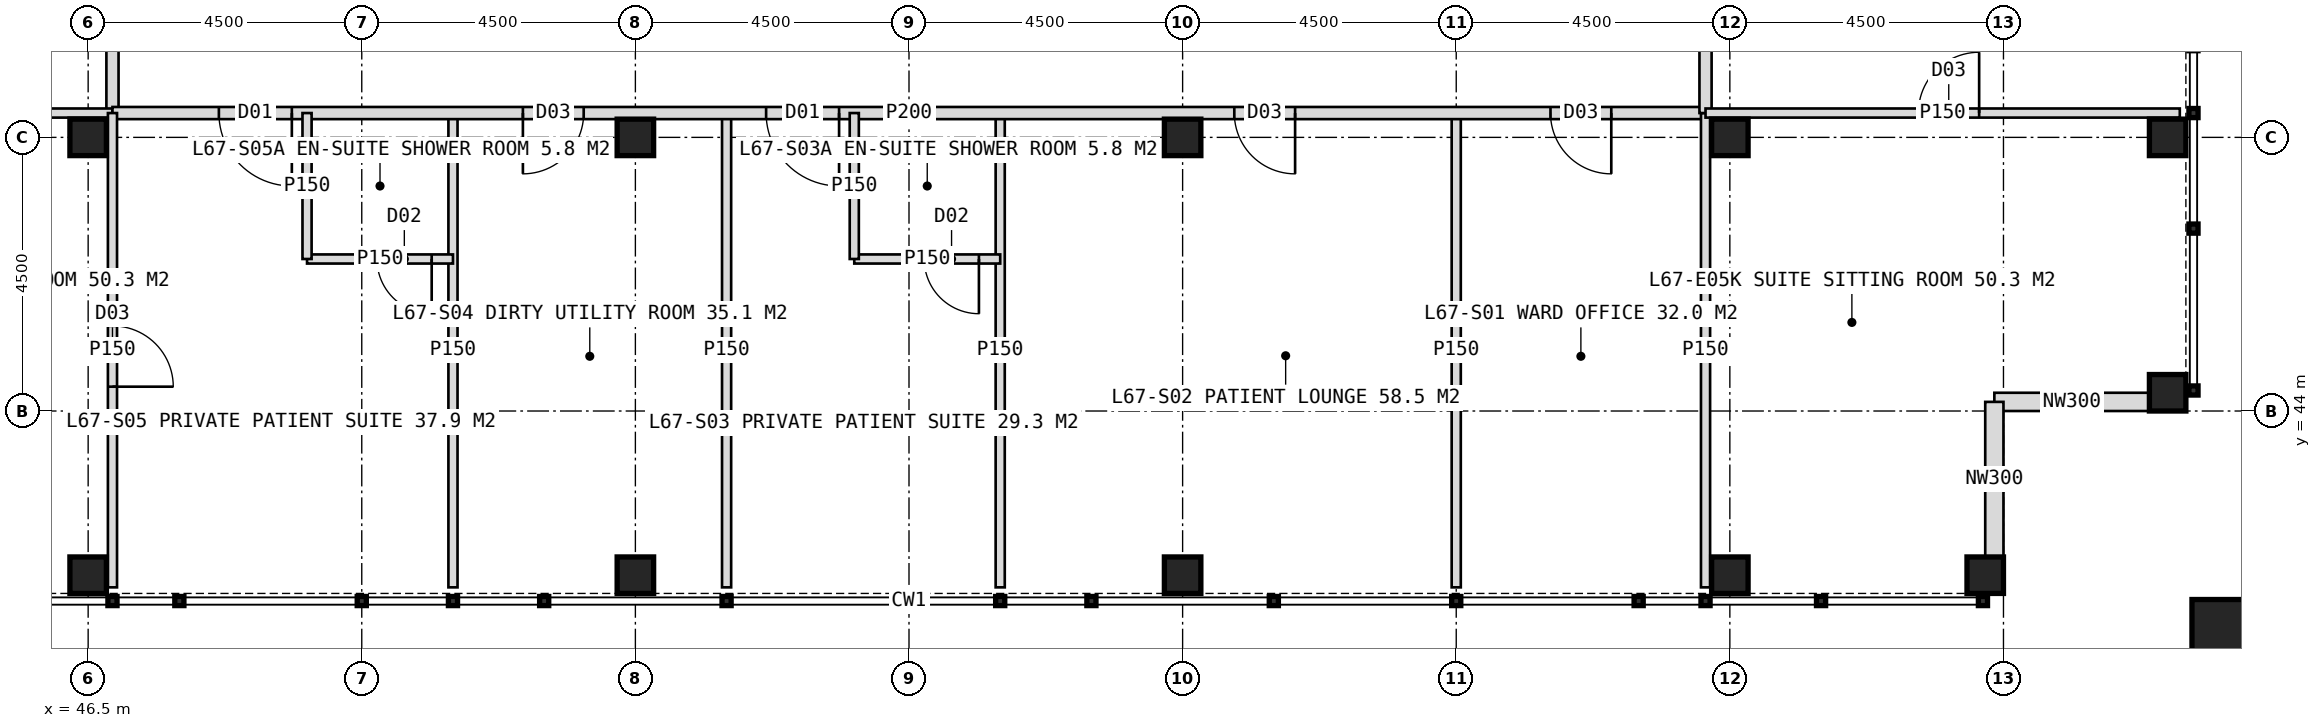
"""IFC4 building model, lengths in metres.
Left out: names, types, materials, properties, quantities, classifications, styles, units other than length and angle.
Written with IfcOpenShell. Run it as: python <this file> out.ifc"""

import sys

from ifc_helpers import new_model, si_unit, direction, frame, frame_2d, origin, origin_2d, place, context, subcontext, project, spatial, rectangle, hollow_rectangle, extrude, element, fill, save


model = new_model("IFC4")
c1 = context("Model", 3, precision=1e-05, world=origin(), true_north=direction((0.0, 1.0)))
c2 = subcontext(c1, "Body", "Model", "MODEL_VIEW")
j1 = project(units=[si_unit("LENGTHUNIT", "METRE"), si_unit("PLANEANGLEUNIT", "RADIAN")], contexts=[c1])
p1 = place(None, origin())
s1 = spatial("IfcSite", under=j1, at=p1, CompositionType="ELEMENT")
p2 = place(p1, origin())
s2 = spatial("IfcBuilding", under=s1, at=p2, CompositionType="ELEMENT")
p3 = place(p2, frame((0.0, 0.0, 278.0)))
s3 = spatial("IfcBuildingStorey", under=s2, at=p3, CompositionType="ELEMENT", Elevation=278.0)
for number, where, z_axis, x_axis in (
    (1, (46.5, 48.5, 0.0), (0.0, 0.0, 1.0), (1.0, 0.0, 0.0)),
    (2, (73.5, 48.5, 0.0), (0.0, 0.0, 1.0), (1.0, 0.0, 0.0)),
    (3, (55.5, 48.5, 0.0), (0.0, 0.0, 1.0), (1.0, 0.0, 0.0)),
    (4, (64.5, 48.5, 0.0), (0.0, 0.0, 1.0), (1.0, 0.0, 0.0)),
    (5, (80.7, 44.3, 0.0), (0.0, 0.0, 1.0), (1.0, 0.0, 0.0)),
    (6, (46.5, 41.3, 0.0), (0.0, 0.0, 1.0), (1.0, 0.0, 0.0)),
    (7, (80.7, 48.5, 0.0), (0.0, 0.0, 1.0), (1.0, 0.0, 0.0)),
    (8, (55.5, 41.3, 0.0), (0.0, 0.0, 1.0), (1.0, 0.0, 0.0)),
    (9, (64.5, 41.3, 0.0), (0.0, 0.0, 1.0), (1.0, 0.0, 0.0)),
    (10, (73.5, 41.3, 0.0), (0.0, 0.0, 1.0), (1.0, 0.0, 0.0)),
    (11, (77.7, 41.3, 0.0), (0.0, 0.0, 1.0), (1.0, 0.0, 0.0)),
):
    element("IfcColumn", number, at=place(p3, frame(where, z_axis=z_axis, x_axis=x_axis)), inside=s3, PredefinedType="COLUMN", context=c2, shape_type="SweptSolid", body=[
        extrude(hollow_rectangle(XDim=0.6, YDim=0.6, WallThickness=0.04, at=origin_2d()), origin(), (0.0, 0.0, 1.0), 4.0),
    ])
p4 = place(p3, frame((81.6, 40.4, 0.0), z_axis=(0.0, 0.0, 1.0), x_axis=(1.0, 0.0, 0.0)))
e12 = element("IfcColumn", 12, at=p4, inside=s3, PredefinedType="COLUMN", context=c2, shape_type="SweptSolid", body=[
    extrude(hollow_rectangle(XDim=1.0, YDim=1.0, WallThickness=0.06, at=origin_2d()), origin(), (0.0, 0.0, 1.0), 4.0),
])
for number, where, z_axis, x_axis in (
    (13, (80.4, 44.15, 0.0), (0.0, 0.0, 1.0), (-1.0, 0.0, 0.0)),
    (14, (77.85, 44.15, 0.0), (0.0, 0.0, 1.0), (0.0, -1.0, 0.0)),
):
    element("IfcWall", number, at=place(p3, frame(where, z_axis=z_axis, x_axis=x_axis)), inside=s3, PredefinedType="ELEMENTEDWALL", context=c2, shape_type="SweptSolid", body=[
        extrude(rectangle(XDim=2.55, YDim=0.3, at=frame_2d((1.275, 0.0))), origin(), (0.0, 0.0, 1.0), 2.95),
    ])
p5 = place(p3, frame((46.9, 48.9, 0.0), z_axis=(0.0, 0.0, 1.0), x_axis=(0.0, 1.0, 0.0)))
e15 = element("IfcWall", 15, at=p5, inside=s3, PredefinedType="PARTITIONING", context=c2, shape_type="SweptSolid", body=[
    extrude(rectangle(XDim=26.2, YDim=0.2, at=frame_2d((13.1, 0.0))), origin(), (0.0, 0.0, 1.0), 3.75),
])
p6 = place(p5, frame((1.75, 0.0, 0.0)))
e16 = element("IfcOpeningElement", 16, at=p6, cuts=e15, PredefinedType="OPENING", context=c2, shape_type="SweptSolid", body=[
    extrude(rectangle(XDim=1.2, YDim=2.2, at=frame_2d((0.6, 1.1))), frame((0.0, 0.11, 0.0), z_axis=(0.0, -1.0, 0.0), x_axis=(1.0, 0.0, 0.0)), (0.0, 0.0, 1.0), 0.22),
])
p7 = place(p5, frame((6.75, 0.0, 0.0)))
e17 = element("IfcOpeningElement", 17, at=p7, cuts=e15, PredefinedType="OPENING", context=c2, shape_type="SweptSolid", body=[
    extrude(rectangle(XDim=1.0, YDim=2.1, at=frame_2d((0.5, 1.05))), frame((0.0, 0.11, 0.0), z_axis=(0.0, -1.0, 0.0), x_axis=(1.0, 0.0, 0.0)), (0.0, 0.0, 1.0), 0.22),
])
p8 = place(p5, frame((11.1, 0.0, 0.0)))
e18 = element("IfcOpeningElement", 18, at=p8, cuts=e15, PredefinedType="OPENING", context=c2, shape_type="SweptSolid", body=[
    extrude(rectangle(XDim=1.0, YDim=2.1, at=frame_2d((0.5, 1.05))), frame((0.0, 0.11, 0.0), z_axis=(0.0, -1.0, 0.0), x_axis=(1.0, 0.0, 0.0)), (0.0, 0.0, 1.0), 0.22),
])
p9 = place(p5, frame((15.75, 0.0, 0.0)))
e19 = element("IfcOpeningElement", 19, at=p9, cuts=e15, PredefinedType="OPENING", context=c2, shape_type="SweptSolid", body=[
    extrude(rectangle(XDim=1.0, YDim=2.1, at=frame_2d((0.5, 1.05))), frame((0.0, 0.11, 0.0), z_axis=(0.0, -1.0, 0.0), x_axis=(1.0, 0.0, 0.0)), (0.0, 0.0, 1.0), 0.22),
])
p10 = place(p5, frame((23.25, 0.0, 0.0)))
e20 = element("IfcOpeningElement", 20, at=p10, cuts=e15, PredefinedType="OPENING", context=c2, shape_type="SweptSolid", body=[
    extrude(rectangle(XDim=1.2, YDim=2.2, at=frame_2d((0.6, 1.1))), frame((0.0, 0.11, 0.0), z_axis=(0.0, -1.0, 0.0), x_axis=(1.0, 0.0, 0.0)), (0.0, 0.0, 1.0), 0.22),
])
for number, where, z_axis, x_axis in (
    (21, (46.9, 48.9, 0.0), (0.0, 0.0, 1.0), (-1.0, 0.0, 0.0)),
    (22, (69.0, 48.9, 0.0), (0.0, 0.0, 1.0), (0.0, -1.0, 0.0)),
    (23, (61.5, 48.9, 0.0), (0.0, 0.0, 1.0), (0.0, -1.0, 0.0)),
    (24, (57.0, 48.9, 0.0), (0.0, 0.0, 1.0), (0.0, -1.0, 0.0)),
    (25, (52.5, 48.9, 0.0), (0.0, 0.0, 1.0), (0.0, -1.0, 0.0)),
):
    element("IfcWall", number, at=place(p3, frame(where, z_axis=z_axis, x_axis=x_axis)), inside=s3, PredefinedType="PARTITIONING", context=c2, shape_type="SweptSolid", body=[
        extrude(rectangle(XDim=7.8, YDim=0.15, at=frame_2d((3.9, 0.0))), origin(), (0.0, 0.0, 1.0), 3.75),
    ])
p11 = place(p3, frame((73.1, 48.9, 0.0), z_axis=(0.0, 0.0, 1.0), x_axis=(-1.0, 0.0, 0.0)))
e26 = element("IfcWall", 26, at=p11, inside=s3, PredefinedType="PARTITIONING", context=c2, shape_type="SweptSolid", body=[
    extrude(rectangle(XDim=26.2, YDim=0.2, at=frame_2d((13.1, 0.0))), origin(), (0.0, 0.0, 1.0), 3.75),
])
p12 = place(p11, frame((1.55, 0.0, 0.0)))
e27 = element("IfcOpeningElement", 27, at=p12, cuts=e26, PredefinedType="OPENING", context=c2, shape_type="SweptSolid", body=[
    extrude(rectangle(XDim=1.0, YDim=2.1, at=frame_2d((0.5, 1.05))), frame((0.0, 0.11, 0.0), z_axis=(0.0, -1.0, 0.0), x_axis=(1.0, 0.0, 0.0)), (0.0, 0.0, 1.0), 0.22),
])
p13 = place(p11, frame((6.75, 0.0, 0.0)))
e28 = element("IfcOpeningElement", 28, at=p13, cuts=e26, PredefinedType="OPENING", context=c2, shape_type="SweptSolid", body=[
    extrude(rectangle(XDim=1.0, YDim=2.1, at=frame_2d((0.5, 1.05))), frame((0.0, 0.11, 0.0), z_axis=(0.0, -1.0, 0.0), x_axis=(1.0, 0.0, 0.0)), (0.0, 0.0, 1.0), 0.22),
])
p14 = place(p11, frame((14.25, 0.0, 0.0)))
e29 = element("IfcOpeningElement", 29, at=p14, cuts=e26, PredefinedType="OPENING", context=c2, shape_type="SweptSolid", body=[
    extrude(rectangle(XDim=1.2, YDim=2.2, at=frame_2d((0.6, 1.1))), frame((0.0, 0.11, 0.0), z_axis=(0.0, -1.0, 0.0), x_axis=(1.0, 0.0, 0.0)), (0.0, 0.0, 1.0), 0.22),
])
p15 = place(p11, frame((18.45, 0.0, 0.0)))
e30 = element("IfcOpeningElement", 30, at=p15, cuts=e26, PredefinedType="OPENING", context=c2, shape_type="SweptSolid", body=[
    extrude(rectangle(XDim=1.0, YDim=2.1, at=frame_2d((0.5, 1.05))), frame((0.0, 0.11, 0.0), z_axis=(0.0, -1.0, 0.0), x_axis=(1.0, 0.0, 0.0)), (0.0, 0.0, 1.0), 0.22),
])
p16 = place(p11, frame((23.25, 0.0, 0.0)))
e31 = element("IfcOpeningElement", 31, at=p16, cuts=e26, PredefinedType="OPENING", context=c2, shape_type="SweptSolid", body=[
    extrude(rectangle(XDim=1.2, YDim=2.2, at=frame_2d((0.6, 1.1))), frame((0.0, 0.11, 0.0), z_axis=(0.0, -1.0, 0.0), x_axis=(1.0, 0.0, 0.0)), (0.0, 0.0, 1.0), 0.22),
])
p17 = place(p3, frame((73.1, 48.9, 0.0), z_axis=(0.0, 0.0, 1.0), x_axis=(0.0, -1.0, 0.0)))
e32 = element("IfcWall", 32, at=p17, inside=s3, PredefinedType="PARTITIONING", context=c2, shape_type="SweptSolid", body=[
    extrude(rectangle(XDim=7.8, YDim=0.15, at=frame_2d((3.9, 0.0))), origin(), (0.0, 0.0, 1.0), 3.75),
])
p18 = place(p3, frame((61.5, 46.5, 0.0), z_axis=(0.0, 0.0, 1.0), x_axis=(-1.0, 0.0, 0.0)))
e33 = element("IfcWall", 33, at=p18, inside=s3, PredefinedType="PARTITIONING", context=c2, shape_type="SweptSolid", body=[
    extrude(rectangle(XDim=2.4, YDim=0.15, at=frame_2d((1.2, 0.0))), origin(), (0.0, 0.0, 1.0), 3.75),
])
p19 = place(p18, frame((0.35, 0.0, 0.0)))
e34 = element("IfcOpeningElement", 34, at=p19, cuts=e33, PredefinedType="OPENING", context=c2, shape_type="SweptSolid", body=[
    extrude(rectangle(XDim=0.9, YDim=2.1, at=frame_2d((0.45, 1.05))), frame((0.0, 0.085, 0.0), z_axis=(0.0, -1.0, 0.0), x_axis=(1.0, 0.0, 0.0)), (0.0, 0.0, 1.0), 0.17),
])
p20 = place(p3, frame((59.1, 48.9, 0.0), z_axis=(0.0, 0.0, 1.0), x_axis=(0.0, -1.0, 0.0)))
e35 = element("IfcWall", 35, at=p20, inside=s3, PredefinedType="PARTITIONING", context=c2, shape_type="SweptSolid", body=[
    extrude(rectangle(XDim=2.4, YDim=0.15, at=frame_2d((1.2, 0.0))), origin(), (0.0, 0.0, 1.0), 3.75),
])
p21 = place(p3, frame((46.9, 48.9, 0.0), z_axis=(0.0, 0.0, 1.0), x_axis=(0.0, -1.0, 0.0)))
e36 = element("IfcWall", 36, at=p21, inside=s3, PredefinedType="PARTITIONING", context=c2, shape_type="SweptSolid", body=[
    extrude(rectangle(XDim=7.8, YDim=0.15, at=frame_2d((3.9, 0.0))), origin(), (0.0, 0.0, 1.0), 3.75),
])
p22 = place(p21, frame((3.5, 0.0, 0.0)))
e37 = element("IfcOpeningElement", 37, at=p22, cuts=e36, PredefinedType="OPENING", context=c2, shape_type="SweptSolid", body=[
    extrude(rectangle(XDim=1.0, YDim=2.1, at=frame_2d((0.5, 1.05))), frame((0.0, 0.085, 0.0), z_axis=(0.0, -1.0, 0.0), x_axis=(1.0, 0.0, 0.0)), (0.0, 0.0, 1.0), 0.17),
])
p23 = place(p3, frame((52.5, 46.5, 0.0), z_axis=(0.0, 0.0, 1.0), x_axis=(-1.0, 0.0, 0.0)))
e38 = element("IfcWall", 38, at=p23, inside=s3, PredefinedType="PARTITIONING", context=c2, shape_type="SweptSolid", body=[
    extrude(rectangle(XDim=2.4, YDim=0.15, at=frame_2d((1.2, 0.0))), origin(), (0.0, 0.0, 1.0), 3.75),
])
p24 = place(p23, frame((0.35, 0.0, 0.0)))
e39 = element("IfcOpeningElement", 39, at=p24, cuts=e38, PredefinedType="OPENING", context=c2, shape_type="SweptSolid", body=[
    extrude(rectangle(XDim=0.9, YDim=2.1, at=frame_2d((0.45, 1.05))), frame((0.0, 0.085, 0.0), z_axis=(0.0, -1.0, 0.0), x_axis=(1.0, 0.0, 0.0)), (0.0, 0.0, 1.0), 0.17),
])
p25 = place(p3, frame((50.1, 48.9, 0.0), z_axis=(0.0, 0.0, 1.0), x_axis=(0.0, -1.0, 0.0)))
e40 = element("IfcWall", 40, at=p25, inside=s3, PredefinedType="PARTITIONING", context=c2, shape_type="SweptSolid", body=[
    extrude(rectangle(XDim=2.4, YDim=0.15, at=frame_2d((1.2, 0.0))), origin(), (0.0, 0.0, 1.0), 3.75),
])
p26 = place(p3, frame((73.1, 71.0, 0.0), z_axis=(0.0, 0.0, 1.0), x_axis=(0.0, -1.0, 0.0)))
e41 = element("IfcWall", 41, at=p26, inside=s3, PredefinedType="PARTITIONING", context=c2, shape_type="SweptSolid", body=[
    extrude(rectangle(XDim=22.1, YDim=0.2, at=frame_2d((11.05, 0.0))), origin(), (0.0, 0.0, 1.0), 3.75),
])
p27 = place(p26, frame((2.5, 0.0, 0.0)))
e42 = element("IfcOpeningElement", 42, at=p27, cuts=e41, PredefinedType="OPENING", context=c2, shape_type="SweptSolid", body=[
    extrude(rectangle(XDim=1.0, YDim=2.1, at=frame_2d((0.5, 1.05))), frame((0.0, 0.11, 0.0), z_axis=(0.0, -1.0, 0.0), x_axis=(1.0, 0.0, 0.0)), (0.0, 0.0, 1.0), 0.22),
])
p28 = place(p26, frame((7.0, 0.0, 0.0)))
e43 = element("IfcOpeningElement", 43, at=p28, cuts=e41, PredefinedType="OPENING", context=c2, shape_type="SweptSolid", body=[
    extrude(rectangle(XDim=1.0, YDim=2.1, at=frame_2d((0.5, 1.05))), frame((0.0, 0.11, 0.0), z_axis=(0.0, -1.0, 0.0), x_axis=(1.0, 0.0, 0.0)), (0.0, 0.0, 1.0), 0.22),
])
p29 = place(p26, frame((9.75, 0.0, 0.0)))
e44 = element("IfcOpeningElement", 44, at=p29, cuts=e41, PredefinedType="OPENING", context=c2, shape_type="SweptSolid", body=[
    extrude(rectangle(XDim=0.9, YDim=2.1, at=frame_2d((0.45, 1.05))), frame((0.0, 0.11, 0.0), z_axis=(0.0, -1.0, 0.0), x_axis=(1.0, 0.0, 0.0)), (0.0, 0.0, 1.0), 0.22),
])
p30 = place(p26, frame((11.65, 0.0, 0.0)))
e45 = element("IfcOpeningElement", 45, at=p30, cuts=e41, PredefinedType="OPENING", context=c2, shape_type="SweptSolid", body=[
    extrude(rectangle(XDim=1.0, YDim=2.1, at=frame_2d((0.5, 1.05))), frame((0.0, 0.11, 0.0), z_axis=(0.0, -1.0, 0.0), x_axis=(1.0, 0.0, 0.0)), (0.0, 0.0, 1.0), 0.22),
])
p31 = place(p26, frame((19.15, 0.0, 0.0)))
e46 = element("IfcOpeningElement", 46, at=p31, cuts=e41, PredefinedType="OPENING", context=c2, shape_type="SweptSolid", body=[
    extrude(rectangle(XDim=1.2, YDim=2.2, at=frame_2d((0.6, 1.1))), frame((0.0, 0.11, 0.0), z_axis=(0.0, -1.0, 0.0), x_axis=(1.0, 0.0, 0.0)), (0.0, 0.0, 1.0), 0.22),
])
p32 = place(p3, frame((73.1, 48.9, 0.0), z_axis=(0.0, 0.0, 1.0), x_axis=(1.0, 0.0, 0.0)))
e47 = element("IfcWall", 47, at=p32, inside=s3, PredefinedType="PARTITIONING", context=c2, shape_type="SweptSolid", body=[
    extrude(rectangle(XDim=7.8, YDim=0.15, at=frame_2d((3.9, 0.0))), origin(), (0.0, 0.0, 1.0), 3.75),
])
p33 = place(p32, frame((3.5, 0.0, 0.0)))
e48 = element("IfcOpeningElement", 48, at=p33, cuts=e47, PredefinedType="OPENING", context=c2, shape_type="SweptSolid", body=[
    extrude(rectangle(XDim=1.0, YDim=2.1, at=frame_2d((0.5, 1.05))), frame((0.0, 0.085, 0.0), z_axis=(0.0, -1.0, 0.0), x_axis=(1.0, 0.0, 0.0)), (0.0, 0.0, 1.0), 0.17),
])
p34 = place(p12, origin())
e49 = element("IfcDoor", 49, at=p34, inside=s3, OperationType="SINGLE_SWING_LEFT", PredefinedType="DOOR", context=c2, shape_type="SweptSolid", body=[
    extrude(rectangle(XDim=1.0, YDim=2.1, at=frame_2d((0.5, 1.05))), frame((0.0, 0.025, 0.0), z_axis=(0.0, -1.0, 0.0), x_axis=(1.0, 0.0, 0.0)), (0.0, 0.0, 1.0), 0.05),
])
fill(e27, e49)
p35 = place(p13, origin())
e50 = element("IfcDoor", 50, at=p35, inside=s3, OperationType="SINGLE_SWING_LEFT", PredefinedType="DOOR", context=c2, shape_type="SweptSolid", body=[
    extrude(rectangle(XDim=1.0, YDim=2.1, at=frame_2d((0.5, 1.05))), frame((0.0, 0.025, 0.0), z_axis=(0.0, -1.0, 0.0), x_axis=(1.0, 0.0, 0.0)), (0.0, 0.0, 1.0), 0.05),
])
fill(e28, e50)
p36 = place(p14, origin())
e51 = element("IfcDoor", 51, at=p36, inside=s3, OperationType="SINGLE_SWING_LEFT", PredefinedType="DOOR", context=c2, shape_type="SweptSolid", body=[
    extrude(rectangle(XDim=1.2, YDim=2.2, at=frame_2d((0.6, 1.1))), frame((0.0, 0.025, 0.0), z_axis=(0.0, -1.0, 0.0), x_axis=(1.0, 0.0, 0.0)), (0.0, 0.0, 1.0), 0.05),
])
fill(e29, e51)
p37 = place(p19, origin())
e52 = element("IfcDoor", 52, at=p37, inside=s3, OperationType="SINGLE_SWING_LEFT", PredefinedType="DOOR", context=c2, shape_type="SweptSolid", body=[
    extrude(rectangle(XDim=0.9, YDim=2.1, at=frame_2d((0.45, 1.05))), frame((0.0, 0.025, 0.0), z_axis=(0.0, -1.0, 0.0), x_axis=(1.0, 0.0, 0.0)), (0.0, 0.0, 1.0), 0.05),
])
fill(e34, e52)
p38 = place(p15, origin())
e53 = element("IfcDoor", 53, at=p38, inside=s3, OperationType="SINGLE_SWING_RIGHT", PredefinedType="DOOR", context=c2, shape_type="SweptSolid", body=[
    extrude(rectangle(XDim=1.0, YDim=2.1, at=frame_2d((0.5, 1.05))), frame((0.0, 0.025, 0.0), z_axis=(0.0, -1.0, 0.0), x_axis=(1.0, 0.0, 0.0)), (0.0, 0.0, 1.0), 0.05),
])
fill(e30, e53)
p39 = place(p22, origin())
e54 = element("IfcDoor", 54, at=p39, inside=s3, OperationType="SINGLE_SWING_RIGHT", PredefinedType="DOOR", context=c2, shape_type="SweptSolid", body=[
    extrude(rectangle(XDim=1.0, YDim=2.1, at=frame_2d((0.5, 1.05))), frame((0.0, 0.025, 0.0), z_axis=(0.0, -1.0, 0.0), x_axis=(1.0, 0.0, 0.0)), (0.0, 0.0, 1.0), 0.05),
])
fill(e37, e54)
p40 = place(p16, origin())
e55 = element("IfcDoor", 55, at=p40, inside=s3, OperationType="SINGLE_SWING_LEFT", PredefinedType="DOOR", context=c2, shape_type="SweptSolid", body=[
    extrude(rectangle(XDim=1.2, YDim=2.2, at=frame_2d((0.6, 1.1))), frame((0.0, 0.025, 0.0), z_axis=(0.0, -1.0, 0.0), x_axis=(1.0, 0.0, 0.0)), (0.0, 0.0, 1.0), 0.05),
])
fill(e31, e55)
p41 = place(p24, origin())
e56 = element("IfcDoor", 56, at=p41, inside=s3, OperationType="SINGLE_SWING_LEFT", PredefinedType="DOOR", context=c2, shape_type="SweptSolid", body=[
    extrude(rectangle(XDim=0.9, YDim=2.1, at=frame_2d((0.45, 1.05))), frame((0.0, 0.025, 0.0), z_axis=(0.0, -1.0, 0.0), x_axis=(1.0, 0.0, 0.0)), (0.0, 0.0, 1.0), 0.05),
])
fill(e39, e56)
p42 = place(p33, origin())
e57 = element("IfcDoor", 57, at=p42, inside=s3, OperationType="SINGLE_SWING_RIGHT", PredefinedType="DOOR", context=c2, shape_type="SweptSolid", body=[
    extrude(rectangle(XDim=1.0, YDim=2.1, at=frame_2d((0.5, 1.05))), frame((0.0, 0.025, 0.0), z_axis=(0.0, -1.0, 0.0), x_axis=(1.0, 0.0, 0.0)), (0.0, 0.0, 1.0), 0.05),
])
fill(e48, e57)
save(model, sys.argv[1])
